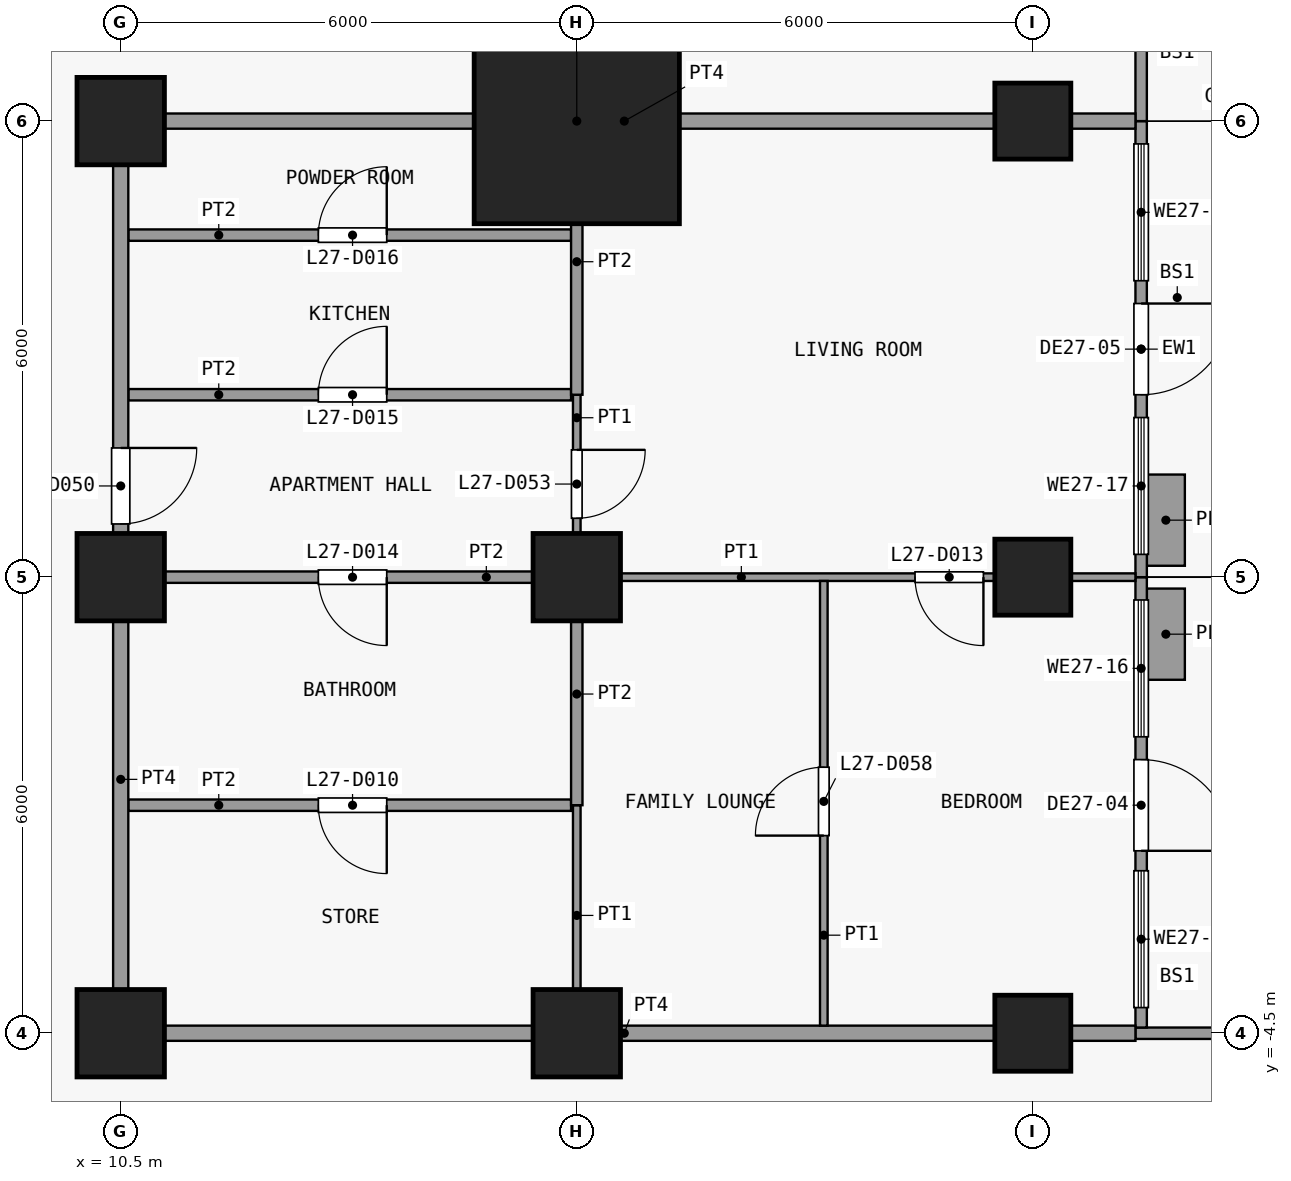
"""IFC4 building model, lengths in metres.
Left out: names, types, materials, properties, quantities, classifications, styles, units other than length and angle.
Written with IfcOpenShell. Run it as: python <this file> out.ifc"""

import sys

from ifc_helpers import new_model, si_unit, direction, frame, frame_2d, origin, origin_2d, place, context, subcontext, project, spatial, rectangle, extrude, element, fill, save


model = new_model("IFC4")
c1 = context("Model", 3, precision=1e-05, world=origin(), true_north=direction((0.0, 1.0)))
c2 = subcontext(c1, "Body", "Model", "MODEL_VIEW")
j1 = project(units=[si_unit("LENGTHUNIT", "METRE"), si_unit("PLANEANGLEUNIT", "RADIAN")], contexts=[c1])
p1 = place(None, origin())
s1 = spatial("IfcSite", under=j1, at=p1, CompositionType="ELEMENT")
p2 = place(p1, origin())
s2 = spatial("IfcBuilding", under=s1, at=p2, CompositionType="ELEMENT")
p3 = place(p2, frame((0.0, 0.0, 109.9)))
s3 = spatial("IfcBuildingStorey", under=s2, at=p3, CompositionType="ELEMENT", Elevation=109.9)
for number, where, z_axis, x_axis in (
    (1, (10.5, -4.5, 0.0), (0.0, 0.0, 1.0), (1.0, 0.0, 0.0)),
    (2, (10.5, 1.5, 0.0), (0.0, 0.0, 1.0), (1.0, 0.0, 0.0)),
    (3, (10.5, 7.5, 0.0), (0.0, 0.0, 1.0), (1.0, 0.0, 0.0)),
    (4, (16.5, -4.5, 0.0), (0.0, 0.0, 1.0), (1.0, 0.0, 0.0)),
    (5, (16.5, 1.5, 0.0), (0.0, 0.0, 1.0), (1.0, 0.0, 0.0)),
):
    element("IfcColumn", number, at=place(p3, frame(where, z_axis=z_axis, x_axis=x_axis)), inside=s3, PredefinedType="COLUMN", context=c2, shape_type="SweptSolid", body=[
        extrude(rectangle(XDim=1.15, YDim=1.15, at=origin_2d()), origin(), (0.0, 0.0, 1.0), 3.6),
    ])
p4 = place(p3, frame((16.5, 7.5, 0.0), z_axis=(0.0, 0.0, 1.0), x_axis=(1.0, 0.0, 0.0)))
e6 = element("IfcColumn", 6, at=p4, inside=s3, PredefinedType="COLUMN", context=c2, shape_type="SweptSolid", body=[
    extrude(rectangle(XDim=2.7, YDim=2.7, at=origin_2d()), origin(), (0.0, 0.0, 1.0), 3.6),
])
for number, where, z_axis, x_axis in (
    (7, (22.5, -4.5, 0.0), (0.0, 0.0, 1.0), (1.0, 0.0, 0.0)),
    (8, (22.5, 1.5, 0.0), (0.0, 0.0, 1.0), (1.0, 0.0, 0.0)),
    (9, (22.5, 7.5, 0.0), (0.0, 0.0, 1.0), (1.0, 0.0, 0.0)),
):
    element("IfcColumn", number, at=place(p3, frame(where, z_axis=z_axis, x_axis=x_axis)), inside=s3, PredefinedType="COLUMN", context=c2, shape_type="SweptSolid", body=[
        extrude(rectangle(XDim=1.0, YDim=1.0, at=origin_2d()), origin(), (0.0, 0.0, 1.0), 3.6),
    ])
p5 = place(p3, frame((23.85, -4.5, 0.0), z_axis=(0.0, 0.0, 1.0), x_axis=(1.0, 0.0, 0.0)))
e10 = element("IfcWall", 10, at=p5, inside=s3, PredefinedType="SOLIDWALL", context=c2, shape_type="SweptSolid", body=[
    extrude(rectangle(XDim=2.55, YDim=0.15, at=frame_2d((1.275, 0.0))), origin(), (0.0, 0.0, 1.0), 3.3),
])
p6 = place(p3, frame((23.925, 1.5, 0.0), z_axis=(0.0, 0.0, 1.0), x_axis=(0.0, -1.0, 0.0)))
e11 = element("IfcWall", 11, at=p6, inside=s3, PredefinedType="SOLIDWALL", context=c2, shape_type="SweptSolid", body=[
    extrude(rectangle(XDim=5.925, YDim=0.15, at=frame_2d((2.962, 0.0))), origin(), (0.0, 0.0, 1.0), 3.3),
])
p7 = place(p6, frame((2.4, 0.0, 0.0)))
e12 = element("IfcOpeningElement", 12, at=p7, cuts=e11, PredefinedType="OPENING", context=c2, shape_type="SweptSolid", body=[
    extrude(rectangle(XDim=1.2, YDim=2.4, at=frame_2d((0.6, 1.2))), frame((0.0, 0.085, 0.0), z_axis=(0.0, -1.0, 0.0), x_axis=(1.0, 0.0, 0.0)), (0.0, 0.0, 1.0), 0.17),
])
p8 = place(p6, frame((3.863, 0.0, 0.9)))
e13 = element("IfcOpeningElement", 13, at=p8, cuts=e11, PredefinedType="OPENING", context=c2, shape_type="SweptSolid", body=[
    extrude(rectangle(XDim=1.8, YDim=2.1, at=frame_2d((0.9, 1.05))), frame((0.0, 0.085, 0.0), z_axis=(0.0, -1.0, 0.0), x_axis=(1.0, 0.0, 0.0)), (0.0, 0.0, 1.0), 0.17),
])
p9 = place(p6, frame((0.3, 0.0, 0.9)))
e14 = element("IfcOpeningElement", 14, at=p9, cuts=e11, PredefinedType="OPENING", context=c2, shape_type="SweptSolid", body=[
    extrude(rectangle(XDim=1.8, YDim=2.1, at=frame_2d((0.9, 1.05))), frame((0.0, 0.085, 0.0), z_axis=(0.0, -1.0, 0.0), x_axis=(1.0, 0.0, 0.0)), (0.0, 0.0, 1.0), 0.17),
])
p10 = place(p3, frame((24.25, 0.15, 0.0), z_axis=(0.0, 0.0, 1.0), x_axis=(0.0, 1.0, 0.0)))
e15 = element("IfcWall", 15, at=p10, inside=s3, PredefinedType="USERDEFINED", context=c2, shape_type="SweptSolid", body=[
    extrude(rectangle(XDim=1.2, YDim=0.5, at=frame_2d((0.6, 0.0))), origin(), (0.0, 0.0, 1.0), 0.9),
])
p11 = place(p3, frame((23.925, 7.5, 0.0), z_axis=(0.0, 0.0, 1.0), x_axis=(0.0, -1.0, 0.0)))
e16 = element("IfcWall", 16, at=p11, inside=s3, PredefinedType="SOLIDWALL", context=c2, shape_type="SweptSolid", body=[
    extrude(rectangle(XDim=6.0, YDim=0.15, at=frame_2d((3.0, 0.0))), origin(), (0.0, 0.0, 1.0), 3.3),
])
p12 = place(p11, frame((2.4, 0.0, 0.0)))
e17 = element("IfcOpeningElement", 17, at=p12, cuts=e16, PredefinedType="OPENING", context=c2, shape_type="SweptSolid", body=[
    extrude(rectangle(XDim=1.2, YDim=2.4, at=frame_2d((0.6, 1.2))), frame((0.0, 0.085, 0.0), z_axis=(0.0, -1.0, 0.0), x_axis=(1.0, 0.0, 0.0)), (0.0, 0.0, 1.0), 0.17),
])
p13 = place(p11, frame((3.9, 0.0, 0.9)))
e18 = element("IfcOpeningElement", 18, at=p13, cuts=e16, PredefinedType="OPENING", context=c2, shape_type="SweptSolid", body=[
    extrude(rectangle(XDim=1.8, YDim=2.1, at=frame_2d((0.9, 1.05))), frame((0.0, 0.085, 0.0), z_axis=(0.0, -1.0, 0.0), x_axis=(1.0, 0.0, 0.0)), (0.0, 0.0, 1.0), 0.17),
])
p14 = place(p11, frame((0.3, 0.0, 0.9)))
e19 = element("IfcOpeningElement", 19, at=p14, cuts=e16, PredefinedType="OPENING", context=c2, shape_type="SweptSolid", body=[
    extrude(rectangle(XDim=1.8, YDim=2.1, at=frame_2d((0.9, 1.05))), frame((0.0, 0.085, 0.0), z_axis=(0.0, -1.0, 0.0), x_axis=(1.0, 0.0, 0.0)), (0.0, 0.0, 1.0), 0.17),
])
p15 = place(p3, frame((24.25, 1.65, 0.0), z_axis=(0.0, 0.0, 1.0), x_axis=(0.0, 1.0, 0.0)))
e20 = element("IfcWall", 20, at=p15, inside=s3, PredefinedType="USERDEFINED", context=c2, shape_type="SweptSolid", body=[
    extrude(rectangle(XDim=1.2, YDim=0.5, at=frame_2d((0.6, 0.0))), origin(), (0.0, 0.0, 1.0), 0.9),
])
p16 = place(p3, frame((23.925, 13.425, 0.0), z_axis=(0.0, 0.0, 1.0), x_axis=(0.0, -1.0, 0.0)))
e21 = element("IfcWall", 21, at=p16, inside=s3, PredefinedType="SOLIDWALL", context=c2, shape_type="SweptSolid", body=[
    extrude(rectangle(XDim=5.925, YDim=0.15, at=frame_2d((2.962, 0.0))), origin(), (0.0, 0.0, 1.0), 3.3),
])
p17 = place(p16, frame((0.825, 0.0, 0.0)))
e22 = element("IfcOpeningElement", 22, at=p17, cuts=e21, PredefinedType="OPENING", context=c2, shape_type="SweptSolid", body=[
    extrude(rectangle(XDim=1.2, YDim=2.4, at=frame_2d((0.6, 1.2))), frame((0.0, 0.085, 0.0), z_axis=(0.0, -1.0, 0.0), x_axis=(1.0, 0.0, 0.0)), (0.0, 0.0, 1.0), 0.17),
])
p18 = place(p16, frame((3.075, 0.0, 0.9)))
e23 = element("IfcOpeningElement", 23, at=p18, cuts=e21, PredefinedType="OPENING", context=c2, shape_type="SweptSolid", body=[
    extrude(rectangle(XDim=1.8, YDim=2.1, at=frame_2d((0.9, 1.05))), frame((0.0, 0.085, 0.0), z_axis=(0.0, -1.0, 0.0), x_axis=(1.0, 0.0, 0.0)), (0.0, 0.0, 1.0), 0.17),
])
p19 = place(p3, frame((10.4, -4.5, 0.0), z_axis=(0.0, 0.0, 1.0), x_axis=(1.0, 0.0, 0.0)))
e24 = element("IfcWall", 24, at=p19, inside=s3, PredefinedType="PARTITIONING", context=c2, shape_type="SweptSolid", body=[
    extrude(rectangle(XDim=13.45, YDim=0.2, at=frame_2d((6.725, 0.0))), origin(), (0.0, 0.0, 1.0), 3.3),
])
p20 = place(p3, frame((10.6, -1.5, 0.0), z_axis=(0.0, 0.0, 1.0), x_axis=(1.0, 0.0, 0.0)))
e25 = element("IfcWall", 25, at=p20, inside=s3, PredefinedType="PARTITIONING", context=c2, shape_type="SweptSolid", body=[
    extrude(rectangle(XDim=5.825, YDim=0.15, at=frame_2d((2.913, 0.0))), origin(), (0.0, 0.0, 1.0), 3.3),
])
p21 = place(p20, frame((2.5, 0.0, 0.0)))
e26 = element("IfcOpeningElement", 26, at=p21, cuts=e25, PredefinedType="OPENING", context=c2, shape_type="SweptSolid", body=[
    extrude(rectangle(XDim=0.9, YDim=2.1, at=frame_2d((0.45, 1.05))), frame((0.0, 0.085, 0.0), z_axis=(0.0, -1.0, 0.0), x_axis=(1.0, 0.0, 0.0)), (0.0, 0.0, 1.0), 0.17),
])
p22 = place(p3, frame((16.5, 1.5, 0.0), z_axis=(0.0, 0.0, 1.0), x_axis=(1.0, 0.0, 0.0)))
e27 = element("IfcWall", 27, at=p22, inside=s3, PredefinedType="PARTITIONING", context=c2, shape_type="SweptSolid", body=[
    extrude(rectangle(XDim=7.35, YDim=0.1, at=frame_2d((3.675, 0.0))), origin(), (0.0, 0.0, 1.0), 3.3),
])
p23 = place(p22, frame((4.45, 0.0, 0.0)))
e28 = element("IfcOpeningElement", 28, at=p23, cuts=e27, PredefinedType="OPENING", context=c2, shape_type="SweptSolid", body=[
    extrude(rectangle(XDim=0.9, YDim=2.1, at=frame_2d((0.45, 1.05))), frame((0.0, 0.06, 0.0), z_axis=(0.0, -1.0, 0.0), x_axis=(1.0, 0.0, 0.0)), (0.0, 0.0, 1.0), 0.12),
])
p24 = place(p3, frame((10.6, 1.5, 0.0), z_axis=(0.0, 0.0, 1.0), x_axis=(1.0, 0.0, 0.0)))
e29 = element("IfcWall", 29, at=p24, inside=s3, PredefinedType="PARTITIONING", context=c2, shape_type="SweptSolid", body=[
    extrude(rectangle(XDim=5.9, YDim=0.15, at=frame_2d((2.95, 0.0))), origin(), (0.0, 0.0, 1.0), 3.3),
])
p25 = place(p24, frame((2.5, 0.0, 0.0)))
e30 = element("IfcOpeningElement", 30, at=p25, cuts=e29, PredefinedType="OPENING", context=c2, shape_type="SweptSolid", body=[
    extrude(rectangle(XDim=0.9, YDim=2.1, at=frame_2d((0.45, 1.05))), frame((0.0, 0.085, 0.0), z_axis=(0.0, -1.0, 0.0), x_axis=(1.0, 0.0, 0.0)), (0.0, 0.0, 1.0), 0.17),
])
p26 = place(p3, frame((10.6, 3.9, 0.0), z_axis=(0.0, 0.0, 1.0), x_axis=(1.0, 0.0, 0.0)))
e31 = element("IfcWall", 31, at=p26, inside=s3, PredefinedType="PARTITIONING", context=c2, shape_type="SweptSolid", body=[
    extrude(rectangle(XDim=5.825, YDim=0.15, at=frame_2d((2.913, 0.0))), origin(), (0.0, 0.0, 1.0), 3.3),
])
p27 = place(p26, frame((2.5, 0.0, 0.0)))
e32 = element("IfcOpeningElement", 32, at=p27, cuts=e31, PredefinedType="OPENING", context=c2, shape_type="SweptSolid", body=[
    extrude(rectangle(XDim=0.9, YDim=2.1, at=frame_2d((0.45, 1.05))), frame((0.0, 0.085, 0.0), z_axis=(0.0, -1.0, 0.0), x_axis=(1.0, 0.0, 0.0)), (0.0, 0.0, 1.0), 0.17),
])
p28 = place(p3, frame((10.6, 6.0, 0.0), z_axis=(0.0, 0.0, 1.0), x_axis=(1.0, 0.0, 0.0)))
e33 = element("IfcWall", 33, at=p28, inside=s3, PredefinedType="PARTITIONING", context=c2, shape_type="SweptSolid", body=[
    extrude(rectangle(XDim=5.825, YDim=0.15, at=frame_2d((2.913, 0.0))), origin(), (0.0, 0.0, 1.0), 3.3),
])
p29 = place(p28, frame((2.5, 0.0, 0.0)))
e34 = element("IfcOpeningElement", 34, at=p29, cuts=e33, PredefinedType="OPENING", context=c2, shape_type="SweptSolid", body=[
    extrude(rectangle(XDim=0.9, YDim=2.1, at=frame_2d((0.45, 1.05))), frame((0.0, 0.085, 0.0), z_axis=(0.0, -1.0, 0.0), x_axis=(1.0, 0.0, 0.0)), (0.0, 0.0, 1.0), 0.17),
])
p30 = place(p3, frame((10.4, 7.5, 0.0), z_axis=(0.0, 0.0, 1.0), x_axis=(1.0, 0.0, 0.0)))
e35 = element("IfcWall", 35, at=p30, inside=s3, PredefinedType="PARTITIONING", context=c2, shape_type="SweptSolid", body=[
    extrude(rectangle(XDim=13.45, YDim=0.2, at=frame_2d((6.725, 0.0))), origin(), (0.0, 0.0, 1.0), 3.3),
])
p31 = place(p3, frame((10.5, -4.4, 0.0), z_axis=(0.0, 0.0, 1.0), x_axis=(0.0, 1.0, 0.0)))
e36 = element("IfcWall", 36, at=p31, inside=s3, PredefinedType="PARTITIONING", context=c2, shape_type="SweptSolid", body=[
    extrude(rectangle(XDim=11.8, YDim=0.2, at=frame_2d((5.9, 0.0))), origin(), (0.0, 0.0, 1.0), 3.3),
])
p32 = place(p31, frame((6.6, 0.0, 0.0)))
e37 = element("IfcOpeningElement", 37, at=p32, cuts=e36, PredefinedType="OPENING", context=c2, shape_type="SweptSolid", body=[
    extrude(rectangle(XDim=1.0, YDim=2.1, at=frame_2d((0.5, 1.05))), frame((0.0, 0.11, 0.0), z_axis=(0.0, -1.0, 0.0), x_axis=(1.0, 0.0, 0.0)), (0.0, 0.0, 1.0), 0.22),
])
p33 = place(p3, frame((16.5, -4.4, 0.0), z_axis=(0.0, 0.0, 1.0), x_axis=(0.0, 1.0, 0.0)))
e38 = element("IfcWall", 38, at=p33, inside=s3, PredefinedType="PARTITIONING", context=c2, shape_type="SweptSolid", body=[
    extrude(rectangle(XDim=2.9, YDim=0.1, at=frame_2d((1.45, 0.0))), origin(), (0.0, 0.0, 1.0), 3.3),
])
p34 = place(p3, frame((16.5, 1.575, 0.0), z_axis=(0.0, 0.0, 1.0), x_axis=(0.0, 1.0, 0.0)))
e39 = element("IfcWall", 39, at=p34, inside=s3, PredefinedType="PARTITIONING", context=c2, shape_type="SweptSolid", body=[
    extrude(rectangle(XDim=2.325, YDim=0.1, at=frame_2d((1.163, 0.0))), origin(), (0.0, 0.0, 1.0), 3.3),
])
p35 = place(p34, frame((0.7, 0.0, 0.0)))
e40 = element("IfcOpeningElement", 40, at=p35, cuts=e39, PredefinedType="OPENING", context=c2, shape_type="SweptSolid", body=[
    extrude(rectangle(XDim=0.9, YDim=2.1, at=frame_2d((0.45, 1.05))), frame((0.0, 0.06, 0.0), z_axis=(0.0, -1.0, 0.0), x_axis=(1.0, 0.0, 0.0)), (0.0, 0.0, 1.0), 0.12),
])
p36 = place(p3, frame((16.5, -1.5, 0.0), z_axis=(0.0, 0.0, 1.0), x_axis=(0.0, 1.0, 0.0)))
e41 = element("IfcWall", 41, at=p36, inside=s3, PredefinedType="PARTITIONING", context=c2, shape_type="SweptSolid", body=[
    extrude(rectangle(XDim=2.925, YDim=0.15, at=frame_2d((1.462, 0.0))), origin(), (0.0, 0.0, 1.0), 3.3),
])
p37 = place(p3, frame((16.5, 3.9, 0.0), z_axis=(0.0, 0.0, 1.0), x_axis=(0.0, 1.0, 0.0)))
e42 = element("IfcWall", 42, at=p37, inside=s3, PredefinedType="PARTITIONING", context=c2, shape_type="SweptSolid", body=[
    extrude(rectangle(XDim=3.5, YDim=0.15, at=frame_2d((1.75, 0.0))), origin(), (0.0, 0.0, 1.0), 3.3),
])
p38 = place(p3, frame((19.75, -4.4, 0.0), z_axis=(0.0, 0.0, 1.0), x_axis=(0.0, 1.0, 0.0)))
e43 = element("IfcWall", 43, at=p38, inside=s3, PredefinedType="PARTITIONING", context=c2, shape_type="SweptSolid", body=[
    extrude(rectangle(XDim=5.85, YDim=0.1, at=frame_2d((2.925, 0.0))), origin(), (0.0, 0.0, 1.0), 3.3),
])
p39 = place(p38, frame((2.5, 0.0, 0.0)))
e44 = element("IfcOpeningElement", 44, at=p39, cuts=e43, PredefinedType="OPENING", context=c2, shape_type="SweptSolid", body=[
    extrude(rectangle(XDim=0.9, YDim=2.1, at=frame_2d((0.45, 1.05))), frame((0.0, 0.06, 0.0), z_axis=(0.0, -1.0, 0.0), x_axis=(1.0, 0.0, 0.0)), (0.0, 0.0, 1.0), 0.12),
])
p40 = place(p7, origin())
e45 = element("IfcDoor", 45, at=p40, inside=s3, OperationType="SINGLE_SWING_RIGHT", PredefinedType="DOOR", context=c2, shape_type="SweptSolid", body=[
    extrude(rectangle(XDim=1.2, YDim=2.4, at=frame_2d((0.6, 1.2))), frame((0.0, 0.025, 0.0), z_axis=(0.0, -1.0, 0.0), x_axis=(1.0, 0.0, 0.0)), (0.0, 0.0, 1.0), 0.05),
])
fill(e12, e45)
p41 = place(p8, origin())
e46 = element("IfcWindow", 46, at=p41, inside=s3, PartitioningType="SINGLE_PANEL", PredefinedType="WINDOW", context=c2, shape_type="SweptSolid", body=[
    extrude(rectangle(XDim=1.8, YDim=2.1, at=frame_2d((0.9, 1.05))), frame((0.0, 0.03, 0.0), z_axis=(0.0, -1.0, 0.0), x_axis=(1.0, 0.0, 0.0)), (0.0, 0.0, 1.0), 0.06),
])
fill(e13, e46)
p42 = place(p9, origin())
e47 = element("IfcWindow", 47, at=p42, inside=s3, PartitioningType="SINGLE_PANEL", PredefinedType="WINDOW", context=c2, shape_type="SweptSolid", body=[
    extrude(rectangle(XDim=1.8, YDim=2.1, at=frame_2d((0.9, 1.05))), frame((0.0, 0.03, 0.0), z_axis=(0.0, -1.0, 0.0), x_axis=(1.0, 0.0, 0.0)), (0.0, 0.0, 1.0), 0.06),
])
fill(e14, e47)
p43 = place(p12, origin())
e48 = element("IfcDoor", 48, at=p43, inside=s3, OperationType="SINGLE_SWING_LEFT", PredefinedType="DOOR", context=c2, shape_type="SweptSolid", body=[
    extrude(rectangle(XDim=1.2, YDim=2.4, at=frame_2d((0.6, 1.2))), frame((0.0, 0.025, 0.0), z_axis=(0.0, -1.0, 0.0), x_axis=(1.0, 0.0, 0.0)), (0.0, 0.0, 1.0), 0.05),
])
fill(e17, e48)
p44 = place(p13, origin())
e49 = element("IfcWindow", 49, at=p44, inside=s3, PartitioningType="SINGLE_PANEL", PredefinedType="WINDOW", context=c2, shape_type="SweptSolid", body=[
    extrude(rectangle(XDim=1.8, YDim=2.1, at=frame_2d((0.9, 1.05))), frame((0.0, 0.03, 0.0), z_axis=(0.0, -1.0, 0.0), x_axis=(1.0, 0.0, 0.0)), (0.0, 0.0, 1.0), 0.06),
])
fill(e18, e49)
p45 = place(p14, origin())
e50 = element("IfcWindow", 50, at=p45, inside=s3, PartitioningType="SINGLE_PANEL", PredefinedType="WINDOW", context=c2, shape_type="SweptSolid", body=[
    extrude(rectangle(XDim=1.8, YDim=2.1, at=frame_2d((0.9, 1.05))), frame((0.0, 0.03, 0.0), z_axis=(0.0, -1.0, 0.0), x_axis=(1.0, 0.0, 0.0)), (0.0, 0.0, 1.0), 0.06),
])
fill(e19, e50)
p46 = place(p21, origin())
e51 = element("IfcDoor", 51, at=p46, inside=s3, OperationType="SINGLE_SWING_RIGHT", PredefinedType="DOOR", context=c2, shape_type="SweptSolid", body=[
    extrude(rectangle(XDim=0.9, YDim=2.1, at=frame_2d((0.45, 1.05))), frame((0.0, 0.025, 0.0), z_axis=(0.0, -1.0, 0.0), x_axis=(1.0, 0.0, 0.0)), (0.0, 0.0, 1.0), 0.05),
])
fill(e26, e51)
p47 = place(p23, origin())
e52 = element("IfcDoor", 52, at=p47, inside=s3, OperationType="SINGLE_SWING_RIGHT", PredefinedType="DOOR", context=c2, shape_type="SweptSolid", body=[
    extrude(rectangle(XDim=0.9, YDim=2.1, at=frame_2d((0.45, 1.05))), frame((0.0, 0.025, 0.0), z_axis=(0.0, -1.0, 0.0), x_axis=(1.0, 0.0, 0.0)), (0.0, 0.0, 1.0), 0.05),
])
fill(e28, e52)
p48 = place(p25, origin())
e53 = element("IfcDoor", 53, at=p48, inside=s3, OperationType="SINGLE_SWING_RIGHT", PredefinedType="DOOR", context=c2, shape_type="SweptSolid", body=[
    extrude(rectangle(XDim=0.9, YDim=2.1, at=frame_2d((0.45, 1.05))), frame((0.0, 0.025, 0.0), z_axis=(0.0, -1.0, 0.0), x_axis=(1.0, 0.0, 0.0)), (0.0, 0.0, 1.0), 0.05),
])
fill(e30, e53)
p49 = place(p27, origin())
e54 = element("IfcDoor", 54, at=p49, inside=s3, OperationType="SINGLE_SWING_LEFT", PredefinedType="DOOR", context=c2, shape_type="SweptSolid", body=[
    extrude(rectangle(XDim=0.9, YDim=2.1, at=frame_2d((0.45, 1.05))), frame((0.0, 0.025, 0.0), z_axis=(0.0, -1.0, 0.0), x_axis=(1.0, 0.0, 0.0)), (0.0, 0.0, 1.0), 0.05),
])
fill(e32, e54)
p50 = place(p29, origin())
e55 = element("IfcDoor", 55, at=p50, inside=s3, OperationType="SINGLE_SWING_LEFT", PredefinedType="DOOR", context=c2, shape_type="SweptSolid", body=[
    extrude(rectangle(XDim=0.9, YDim=2.1, at=frame_2d((0.45, 1.05))), frame((0.0, 0.025, 0.0), z_axis=(0.0, -1.0, 0.0), x_axis=(1.0, 0.0, 0.0)), (0.0, 0.0, 1.0), 0.05),
])
fill(e34, e55)
p51 = place(p32, origin())
e56 = element("IfcDoor", 56, at=p51, inside=s3, OperationType="SINGLE_SWING_RIGHT", PredefinedType="DOOR", context=c2, shape_type="SweptSolid", body=[
    extrude(rectangle(XDim=1.0, YDim=2.1, at=frame_2d((0.5, 1.05))), frame((0.0, 0.025, 0.0), z_axis=(0.0, -1.0, 0.0), x_axis=(1.0, 0.0, 0.0)), (0.0, 0.0, 1.0), 0.05),
])
fill(e37, e56)
p52 = place(p35, origin())
e57 = element("IfcDoor", 57, at=p52, inside=s3, OperationType="SINGLE_SWING_RIGHT", PredefinedType="DOOR", context=c2, shape_type="SweptSolid", body=[
    extrude(rectangle(XDim=0.9, YDim=2.1, at=frame_2d((0.45, 1.05))), frame((0.0, 0.025, 0.0), z_axis=(0.0, -1.0, 0.0), x_axis=(1.0, 0.0, 0.0)), (0.0, 0.0, 1.0), 0.05),
])
fill(e40, e57)
p53 = place(p39, origin())
e58 = element("IfcDoor", 58, at=p53, inside=s3, OperationType="SINGLE_SWING_RIGHT", PredefinedType="DOOR", context=c2, shape_type="SweptSolid", body=[
    extrude(rectangle(XDim=0.9, YDim=2.1, at=frame_2d((0.45, 1.05))), frame((0.0, 0.025, 0.0), z_axis=(0.0, -1.0, 0.0), x_axis=(1.0, 0.0, 0.0)), (0.0, 0.0, 1.0), 0.05),
])
fill(e44, e58)
save(model, sys.argv[1])
